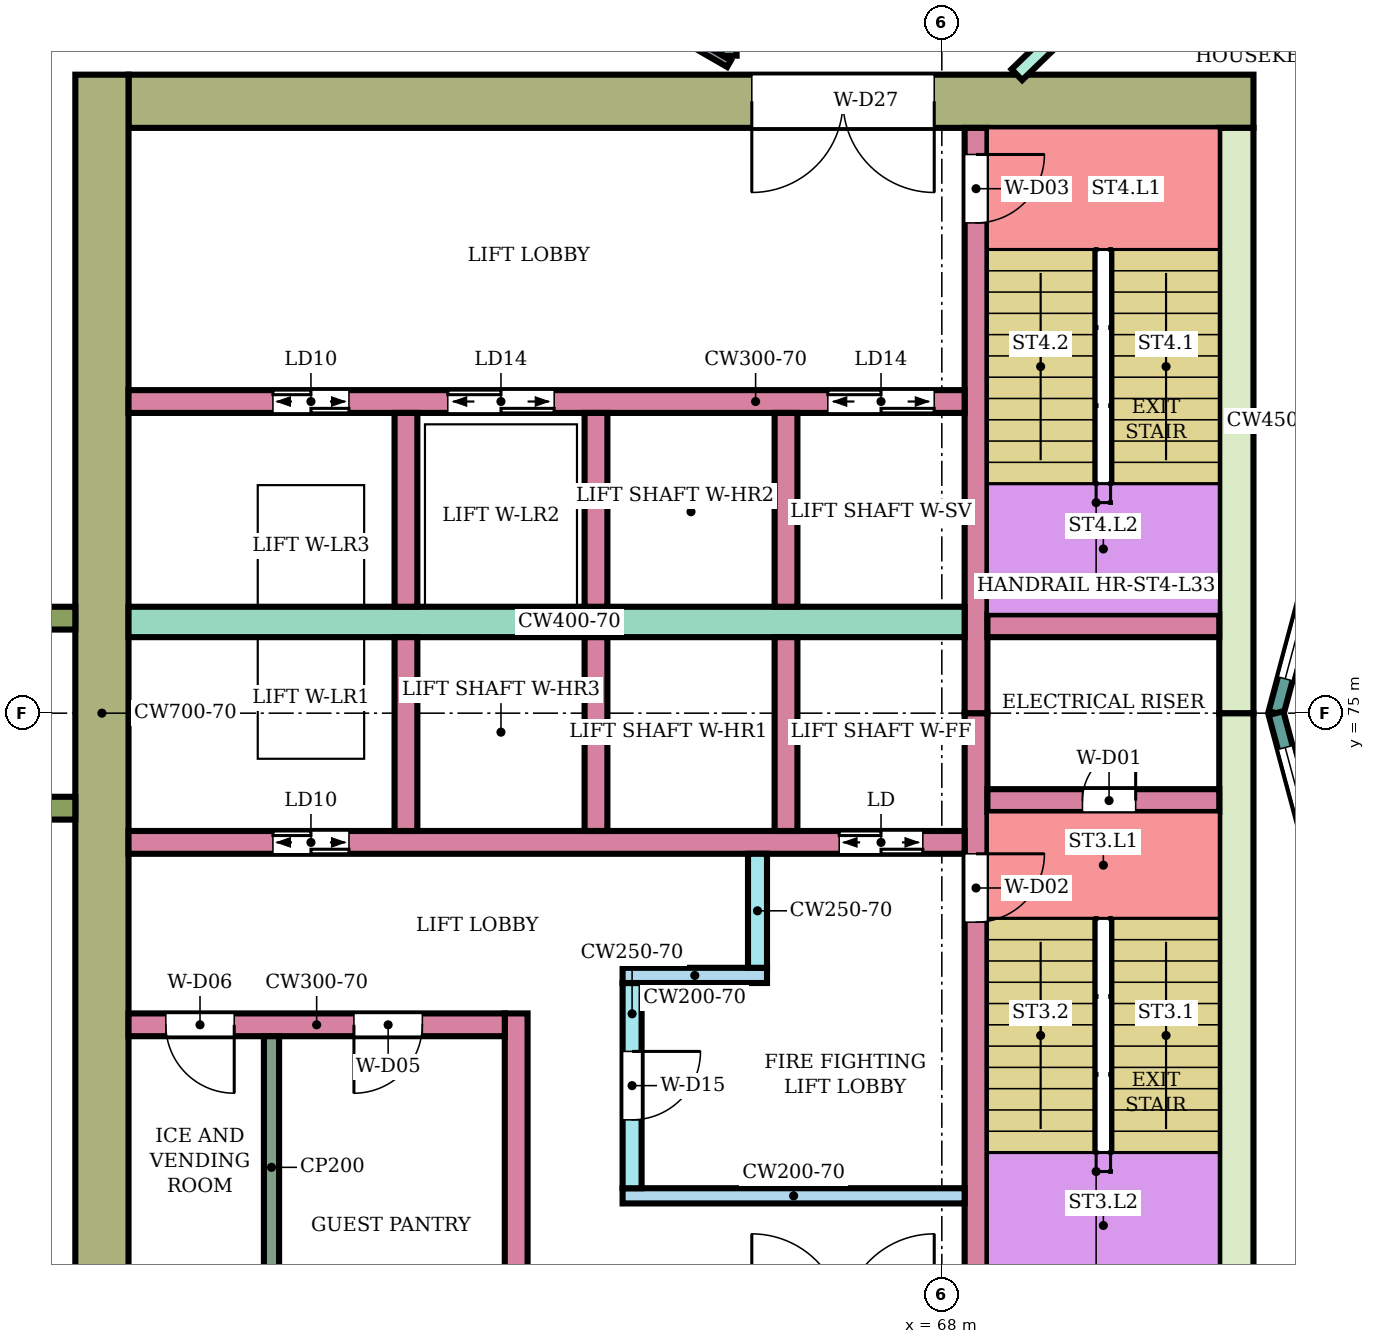
"""IFC4 building model, lengths in metres.
Left out: names, types, materials, properties, quantities, classifications, styles, units other than length and angle.
Written with IfcOpenShell. Run it as: python <this file> out.ifc"""

import sys

from ifc_helpers import new_model, si_unit, direction, frame, frame_2d, origin, place, context, subcontext, project, spatial, rectangle, extrude, element, fill, save


model = new_model("IFC4")
c1 = context("Model", 3, precision=1e-05, world=origin(), true_north=direction((0.0, 1.0)))
c2 = subcontext(c1, "Body", "Model", "MODEL_VIEW")
j1 = project(units=[si_unit("LENGTHUNIT", "METRE"), si_unit("PLANEANGLEUNIT", "RADIAN")], contexts=[c1])
p1 = place(None, origin())
s1 = spatial("IfcSite", under=j1, at=p1, CompositionType="ELEMENT")
p2 = place(p1, origin())
s2 = spatial("IfcBuilding", under=s1, at=p2, CompositionType="ELEMENT")
p3 = place(p2, frame((0.0, 0.0, 141.9)))
s3 = spatial("IfcBuildingStorey", under=s2, at=p3, CompositionType="ELEMENT", Elevation=141.9)
p4 = place(p3, frame((72.1, 83.05, 0.0), z_axis=(0.0, 0.0, 1.0), x_axis=(-1.0, 0.0, 0.0)))
e1 = element("IfcWall", 1, at=p4, inside=s3, PredefinedType="SHEAR", context=c2, shape_type="SweptSolid", body=[
    extrude(rectangle(XDim=14.8, YDim=0.7, at=frame_2d((7.4, 0.0))), origin(), (0.0, 0.0, 1.0), 3.58),
])
p5 = place(p4, frame((4.2, 0.0, 0.0)))
e2 = element("IfcOpeningElement", 2, at=p5, cuts=e1, PredefinedType="OPENING", context=c2, shape_type="SweptSolid", body=[
    extrude(rectangle(XDim=2.4, YDim=2.4, at=frame_2d((1.2, 1.2))), frame((0.0, 0.36, 0.0), z_axis=(0.0, -1.0, 0.0), x_axis=(1.0, 0.0, 0.0)), (0.0, 0.0, 1.0), 0.72),
])
for number, where, z_axis, x_axis in (
    (3, (71.875, 75.0, 0.0), (0.0, 0.0, 1.0), (0.0, -1.0, 0.0)),
    (4, (71.875, 82.7, 0.0), (0.0, 0.0, 1.0), (0.0, -1.0, 0.0)),
):
    element("IfcWall", number, at=place(p3, frame(where, z_axis=z_axis, x_axis=x_axis)), inside=s3, PredefinedType="SHEAR", context=c2, shape_type="SweptSolid", body=[
        extrude(rectangle(XDim=7.7, YDim=0.45, at=frame_2d((3.85, 0.0))), origin(), (0.0, 0.0, 1.0), 3.58),
    ])
p6 = place(p3, frame((56.95, 83.4, 0.0), z_axis=(0.0, 0.0, 1.0), x_axis=(0.0, -1.0, 0.0)))
e5 = element("IfcWall", 5, at=p6, inside=s3, PredefinedType="SHEAR", context=c2, shape_type="SweptSolid", body=[
    extrude(rectangle(XDim=16.8, YDim=0.7, at=frame_2d((8.4, 0.0))), origin(), (0.0, 0.0, 1.0), 3.58),
])
p7 = place(p3, frame((68.45, 75.0, 0.0), z_axis=(0.0, 0.0, 1.0), x_axis=(0.0, -1.0, 0.0)))
e6 = element("IfcWall", 6, at=p7, inside=s3, PredefinedType="SHEAR", context=c2, shape_type="SweptSolid", body=[
    extrude(rectangle(XDim=7.7, YDim=0.3, at=frame_2d((3.85, 0.0))), origin(), (0.0, 0.0, 1.0), 3.58),
])
p8 = place(p7, frame((1.85, 0.0, 0.0)))
e7 = element("IfcOpeningElement", 7, at=p8, cuts=e6, PredefinedType="OPENING", context=c2, shape_type="SweptSolid", body=[
    extrude(rectangle(XDim=0.9, YDim=2.1, at=frame_2d((0.45, 1.05))), frame((0.0, 0.16, 0.0), z_axis=(0.0, -1.0, 0.0), x_axis=(1.0, 0.0, 0.0)), (0.0, 0.0, 1.0), 0.32),
])
p9 = place(p3, frame((68.45, 82.7, 0.0), z_axis=(0.0, 0.0, 1.0), x_axis=(0.0, -1.0, 0.0)))
e8 = element("IfcWall", 8, at=p9, inside=s3, PredefinedType="SHEAR", context=c2, shape_type="SweptSolid", body=[
    extrude(rectangle(XDim=7.7, YDim=0.3, at=frame_2d((3.85, 0.0))), origin(), (0.0, 0.0, 1.0), 3.58),
])
p10 = place(p9, frame((0.35, 0.0, 0.0)))
e9 = element("IfcOpeningElement", 9, at=p10, cuts=e8, PredefinedType="OPENING", context=c2, shape_type="SweptSolid", body=[
    extrude(rectangle(XDim=0.9, YDim=2.1, at=frame_2d((0.45, 1.05))), frame((0.0, 0.16, 0.0), z_axis=(0.0, -1.0, 0.0), x_axis=(1.0, 0.0, 0.0)), (0.0, 0.0, 1.0), 0.32),
])
p11 = place(p3, frame((71.65, 73.85, 0.0), z_axis=(0.0, 0.0, 1.0), x_axis=(-1.0, 0.0, 0.0)))
e10 = element("IfcWall", 10, at=p11, inside=s3, PredefinedType="SHEAR", context=c2, shape_type="SweptSolid", body=[
    extrude(rectangle(XDim=3.05, YDim=0.3, at=frame_2d((1.525, 0.0))), origin(), (0.0, 0.0, 1.0), 3.58),
])
p12 = place(p11, frame((1.1, 0.0, 0.0)))
e11 = element("IfcOpeningElement", 11, at=p12, cuts=e10, PredefinedType="OPENING", context=c2, shape_type="SweptSolid", body=[
    extrude(rectangle(XDim=0.7, YDim=2.0, at=frame_2d((0.35, 1.0))), frame((0.0, 0.16, 0.0), z_axis=(0.0, -1.0, 0.0), x_axis=(1.0, 0.0, 0.0)), (0.0, 0.0, 1.0), 0.32),
])
p13 = place(p3, frame((71.65, 76.15, 0.0), z_axis=(0.0, 0.0, 1.0), x_axis=(-1.0, 0.0, 0.0)))
e12 = element("IfcWall", 12, at=p13, inside=s3, PredefinedType="SHEAR", context=c2, shape_type="SweptSolid", body=[
    extrude(rectangle(XDim=3.05, YDim=0.3, at=frame_2d((1.525, 0.0))), origin(), (0.0, 0.0, 1.0), 3.58),
])
p14 = place(p3, frame((68.3, 73.3, 0.0), z_axis=(0.0, 0.0, 1.0), x_axis=(-1.0, 0.0, 0.0)))
e13 = element("IfcWall", 13, at=p14, inside=s3, PredefinedType="SHEAR", context=c2, shape_type="SweptSolid", body=[
    extrude(rectangle(XDim=11.0, YDim=0.3, at=frame_2d((5.5, 0.0))), origin(), (0.0, 0.0, 1.0), 3.58),
])
p15 = place(p14, frame((0.55, 0.0, 0.0)))
e14 = element("IfcOpeningElement", 14, at=p15, cuts=e13, PredefinedType="OPENING", context=c2, shape_type="SweptSolid", body=[
    extrude(rectangle(XDim=1.1, YDim=2.1, at=frame_2d((0.55, 1.05))), frame((0.0, 0.16, 0.0), z_axis=(0.0, -1.0, 0.0), x_axis=(1.0, 0.0, 0.0)), (0.0, 0.0, 1.0), 0.32),
])
p16 = place(p14, frame((8.1, 0.0, 0.0)))
e15 = element("IfcOpeningElement", 15, at=p16, cuts=e13, PredefinedType="OPENING", context=c2, shape_type="SweptSolid", body=[
    extrude(rectangle(XDim=1.0, YDim=2.1, at=frame_2d((0.5, 1.05))), frame((0.0, 0.16, 0.0), z_axis=(0.0, -1.0, 0.0), x_axis=(1.0, 0.0, 0.0)), (0.0, 0.0, 1.0), 0.32),
])
p17 = place(p3, frame((68.3, 76.2, 0.0), z_axis=(0.0, 0.0, 1.0), x_axis=(-1.0, 0.0, 0.0)))
e16 = element("IfcWall", 16, at=p17, inside=s3, PredefinedType="SHEAR", context=c2, shape_type="SweptSolid", body=[
    extrude(rectangle(XDim=11.0, YDim=0.4, at=frame_2d((5.5, 0.0))), origin(), (0.0, 0.0, 1.0), 3.58),
])
p18 = place(p3, frame((68.3, 79.1, 0.0), z_axis=(0.0, 0.0, 1.0), x_axis=(-1.0, 0.0, 0.0)))
e17 = element("IfcWall", 17, at=p18, inside=s3, PredefinedType="SHEAR", context=c2, shape_type="SweptSolid", body=[
    extrude(rectangle(XDim=11.0, YDim=0.3, at=frame_2d((5.5, 0.0))), origin(), (0.0, 0.0, 1.0), 3.58),
])
p19 = place(p18, frame((0.4, 0.0, 0.0)))
e18 = element("IfcOpeningElement", 18, at=p19, cuts=e17, PredefinedType="OPENING", context=c2, shape_type="SweptSolid", body=[
    extrude(rectangle(XDim=1.4, YDim=2.1, at=frame_2d((0.7, 1.05))), frame((0.0, 0.16, 0.0), z_axis=(0.0, -1.0, 0.0), x_axis=(1.0, 0.0, 0.0)), (0.0, 0.0, 1.0), 0.32),
])
p20 = place(p18, frame((5.4, 0.0, 0.0)))
e19 = element("IfcOpeningElement", 19, at=p20, cuts=e17, PredefinedType="OPENING", context=c2, shape_type="SweptSolid", body=[
    extrude(rectangle(XDim=1.4, YDim=2.1, at=frame_2d((0.7, 1.05))), frame((0.0, 0.16, 0.0), z_axis=(0.0, -1.0, 0.0), x_axis=(1.0, 0.0, 0.0)), (0.0, 0.0, 1.0), 0.32),
])
p21 = place(p18, frame((8.1, 0.0, 0.0)))
e20 = element("IfcOpeningElement", 20, at=p21, cuts=e17, PredefinedType="OPENING", context=c2, shape_type="SweptSolid", body=[
    extrude(rectangle(XDim=1.0, YDim=2.1, at=frame_2d((0.5, 1.05))), frame((0.0, 0.16, 0.0), z_axis=(0.0, -1.0, 0.0), x_axis=(1.0, 0.0, 0.0)), (0.0, 0.0, 1.0), 0.32),
])
for number, where, z_axis, x_axis in (
    (21, (65.95, 76.0, 0.0), (0.0, 0.0, 1.0), (0.0, -1.0, 0.0)),
    (22, (63.45, 76.0, 0.0), (0.0, 0.0, 1.0), (0.0, -1.0, 0.0)),
    (23, (60.95, 76.0, 0.0), (0.0, 0.0, 1.0), (0.0, -1.0, 0.0)),
    (24, (65.95, 78.95, 0.0), (0.0, 0.0, 1.0), (0.0, -1.0, 0.0)),
    (25, (63.45, 78.95, 0.0), (0.0, 0.0, 1.0), (0.0, -1.0, 0.0)),
    (26, (60.95, 78.95, 0.0), (0.0, 0.0, 1.0), (0.0, -1.0, 0.0)),
):
    element("IfcWall", number, at=place(p3, frame(where, z_axis=z_axis, x_axis=x_axis)), inside=s3, PredefinedType="SHEAR", context=c2, shape_type="SweptSolid", body=[
        extrude(rectangle(XDim=2.55, YDim=0.3, at=frame_2d((1.275, 0.0))), origin(), (0.0, 0.0, 1.0), 3.58),
    ])
p22 = place(p3, frame((68.3, 68.65, 0.0), z_axis=(0.0, 0.0, 1.0), x_axis=(-1.0, 0.0, 0.0)))
e27 = element("IfcWall", 27, at=p22, inside=s3, PredefinedType="SHEAR", context=c2, shape_type="SweptSolid", body=[
    extrude(rectangle(XDim=4.5, YDim=0.2, at=frame_2d((2.25, 0.0))), origin(), (0.0, 0.0, 1.0), 3.58),
])
p23 = place(p3, frame((63.925, 71.45, 0.0), z_axis=(0.0, 0.0, 1.0), x_axis=(0.0, -1.0, 0.0)))
e28 = element("IfcWall", 28, at=p23, inside=s3, PredefinedType="SHEAR", context=c2, shape_type="SweptSolid", body=[
    extrude(rectangle(XDim=2.7, YDim=0.25, at=frame_2d((1.35, 0.0))), origin(), (0.0, 0.0, 1.0), 3.58),
])
p24 = place(p23, frame((0.9, 0.0, 0.0)))
e29 = element("IfcOpeningElement", 29, at=p24, cuts=e28, PredefinedType="OPENING", context=c2, shape_type="SweptSolid", body=[
    extrude(rectangle(XDim=0.9, YDim=2.1, at=frame_2d((0.45, 1.05))), frame((0.0, 0.135, 0.0), z_axis=(0.0, -1.0, 0.0), x_axis=(1.0, 0.0, 0.0)), (0.0, 0.0, 1.0), 0.27),
])
p25 = place(p3, frame((65.7, 71.55, 0.0), z_axis=(0.0, 0.0, 1.0), x_axis=(-1.0, 0.0, 0.0)))
e30 = element("IfcWall", 30, at=p25, inside=s3, PredefinedType="SHEAR", context=c2, shape_type="SweptSolid", body=[
    extrude(rectangle(XDim=1.9, YDim=0.2, at=frame_2d((0.95, 0.0))), origin(), (0.0, 0.0, 1.0), 3.58),
])
p26 = place(p3, frame((65.575, 73.15, 0.0), z_axis=(0.0, 0.0, 1.0), x_axis=(0.0, -1.0, 0.0)))
e31 = element("IfcWall", 31, at=p26, inside=s3, PredefinedType="SHEAR", context=c2, shape_type="SweptSolid", body=[
    extrude(rectangle(XDim=1.5, YDim=0.25, at=frame_2d((0.75, 0.0))), origin(), (0.0, 0.0, 1.0), 3.58),
])
p27 = place(p3, frame((62.4, 71.05, 0.0), z_axis=(0.0, 0.0, 1.0), x_axis=(0.0, -1.0, 0.0)))
e32 = element("IfcWall", 32, at=p27, inside=s3, PredefinedType="SHEAR", context=c2, shape_type="SweptSolid", body=[
    extrude(rectangle(XDim=3.75, YDim=0.3, at=frame_2d((1.875, 0.0))), origin(), (0.0, 0.0, 1.0), 3.58),
])
p28 = place(p3, frame((62.25, 70.9, 0.0), z_axis=(0.0, 0.0, 1.0), x_axis=(-1.0, 0.0, 0.0)))
e33 = element("IfcWall", 33, at=p28, inside=s3, PredefinedType="SHEAR", context=c2, shape_type="SweptSolid", body=[
    extrude(rectangle(XDim=4.95, YDim=0.3, at=frame_2d((2.475, 0.0))), origin(), (0.0, 0.0, 1.0), 3.58),
])
p29 = place(p28, frame((1.084, 0.0, 0.0)))
e34 = element("IfcOpeningElement", 34, at=p29, cuts=e33, PredefinedType="OPENING", context=c2, shape_type="SweptSolid", body=[
    extrude(rectangle(XDim=0.9, YDim=2.1, at=frame_2d((0.45, 1.05))), frame((0.0, 0.16, 0.0), z_axis=(0.0, -1.0, 0.0), x_axis=(1.0, 0.0, 0.0)), (0.0, 0.0, 1.0), 0.32),
])
p30 = place(p28, frame((3.56, 0.0, 0.0)))
e35 = element("IfcOpeningElement", 35, at=p30, cuts=e33, PredefinedType="OPENING", context=c2, shape_type="SweptSolid", body=[
    extrude(rectangle(XDim=0.9, YDim=2.1, at=frame_2d((0.45, 1.05))), frame((0.0, 0.16, 0.0), z_axis=(0.0, -1.0, 0.0), x_axis=(1.0, 0.0, 0.0)), (0.0, 0.0, 1.0), 0.32),
])
for number, where, z_axis, x_axis in (
    (36, (56.6, 76.25, 0.0), (0.0, 0.0, 1.0), (-1.0, 0.0, 0.0)),
    (37, (56.6, 73.75, 0.0), (0.0, 0.0, 1.0), (-1.0, 0.0, 0.0)),
):
    element("IfcWall", number, at=place(p3, frame(where, z_axis=z_axis, x_axis=x_axis)), inside=s3, PredefinedType="NOTDEFINED", context=c2, shape_type="SweptSolid", body=[
        extrude(rectangle(XDim=2.416, YDim=0.3, at=frame_2d((1.208, 0.0))), origin(), (0.0, 0.0, 1.0), 3.9),
    ])
p31 = place(p3, frame((73.415, 78.802, 0.0), z_axis=(0.0, 0.0, 1.0), x_axis=(-0.258789828301, -0.965933654434, 0.0)))
e38 = element("IfcWall", 38, at=p31, inside=s3, PredefinedType="NOTDEFINED", context=c2, shape_type="SweptSolid", body=[
    extrude(rectangle(XDim=3.936, YDim=0.2, at=frame_2d((1.968, 0.0))), origin(), (0.0, 0.0, 1.0), 3.9),
])
p32 = place(p31, frame((0.468, 0.0, 0.9)))
e39 = element("IfcOpeningElement", 39, at=p32, cuts=e38, PredefinedType="OPENING", context=c2, shape_type="SweptSolid", body=[
    extrude(rectangle(XDim=3.0, YDim=2.3, at=frame_2d((1.5, 1.15))), frame((0.0, 0.11, 0.0), z_axis=(0.0, -1.0, 0.0), x_axis=(1.0, 0.0, 0.0)), (0.0, 0.0, 1.0), 0.22),
])
p33 = place(p3, frame((72.396, 75.0, 0.0), z_axis=(0.0, 0.0, 1.0), x_axis=(0.258789828301, -0.965933654434, 0.0)))
e40 = element("IfcWall", 40, at=p33, inside=s3, PredefinedType="NOTDEFINED", context=c2, shape_type="SweptSolid", body=[
    extrude(rectangle(XDim=3.936, YDim=0.2, at=frame_2d((1.968, 0.0))), origin(), (0.0, 0.0, 1.0), 3.9),
])
p34 = place(p33, frame((0.468, 0.0, 0.9)))
e41 = element("IfcOpeningElement", 41, at=p34, cuts=e40, PredefinedType="OPENING", context=c2, shape_type="SweptSolid", body=[
    extrude(rectangle(XDim=3.0, YDim=2.3, at=frame_2d((1.5, 1.15))), frame((0.0, 0.11, 0.0), z_axis=(0.0, -1.0, 0.0), x_axis=(1.0, 0.0, 0.0)), (0.0, 0.0, 1.0), 0.22),
])
p35 = place(p3, frame((65.2, 83.65, 0.0), z_axis=(0.0, 0.0, 1.0), x_axis=(0.0, 1.0, 0.0)))
e42 = element("IfcWall", 42, at=p35, inside=s3, PredefinedType="PARTITIONING", context=c2, shape_type="SweptSolid", body=[
    extrude(rectangle(XDim=1.15, YDim=0.2, at=frame_2d((0.575, 0.0))), origin(), (0.0, 0.0, 1.0), 3.45),
])
p36 = place(p3, frame((68.987, 83.4, 0.0), z_axis=(0.0, 0.0, 1.0), x_axis=(0.719547721855, 0.694442996922, 0.0)))
e43 = element("IfcWall", 43, at=p36, inside=s3, PredefinedType="PARTITIONING", context=c2, shape_type="SweptSolid", body=[
    extrude(rectangle(XDim=5.378, YDim=0.2, at=frame_2d((2.689, 0.0))), origin(), (0.0, 0.0, 1.0), 3.45),
])
p37 = place(p36, frame((2.294, 0.0, 0.0)))
e44 = element("IfcOpeningElement", 44, at=p37, cuts=e43, PredefinedType="OPENING", context=c2, shape_type="SweptSolid", body=[
    extrude(rectangle(XDim=0.9, YDim=2.1, at=frame_2d((0.45, 1.05))), frame((0.0, 0.11, 0.0), z_axis=(0.0, -1.0, 0.0), x_axis=(1.0, 0.0, 0.0)), (0.0, 0.0, 1.0), 0.22),
])
p38 = place(p3, frame((57.659, 87.899, 0.0), z_axis=(0.0, 0.0, 1.0), x_axis=(0.86602264145, -0.500004784474, 0.0)))
e45 = element("IfcWall", 45, at=p38, inside=s3, PredefinedType="PARTITIONING", context=c2, shape_type="SweptSolid", body=[
    extrude(rectangle(XDim=8.708, YDim=0.1, at=frame_2d((4.354, 0.0))), origin(), (0.0, 0.0, 1.0), 3.45),
])
p39 = place(p38, frame((3.929, 0.0, 0.0)))
e46 = element("IfcOpeningElement", 46, at=p39, cuts=e45, PredefinedType="OPENING", context=c2, shape_type="SweptSolid", body=[
    extrude(rectangle(XDim=0.9, YDim=2.1, at=frame_2d((0.45, 1.05))), frame((0.0, 0.06, 0.0), z_axis=(0.0, -1.0, 0.0), x_axis=(1.0, 0.0, 0.0)), (0.0, 0.0, 1.0), 0.12),
])
p40 = place(p3, frame((59.181, 70.75, 0.0), z_axis=(0.0, 0.0, 1.0), x_axis=(0.0, -1.0, 0.0)))
e47 = element("IfcWall", 47, at=p40, inside=s3, PredefinedType="PARTITIONING", context=c2, shape_type="SweptSolid", body=[
    extrude(rectangle(XDim=3.45, YDim=0.2, at=frame_2d((1.725, 0.0))), origin(), (0.0, 0.0, 1.0), 3.58),
])
p41 = place(p32, origin())
e48 = element("IfcWindow", 48, at=p41, inside=s3, PartitioningType="SINGLE_PANEL", PredefinedType="WINDOW", context=c2, shape_type="SweptSolid", body=[
    extrude(rectangle(XDim=3.0, YDim=2.3, at=frame_2d((1.5, 1.15))), frame((0.0, 0.03, 0.0), z_axis=(0.0, -1.0, 0.0), x_axis=(1.0, 0.0, 0.0)), (0.0, 0.0, 1.0), 0.06),
])
fill(e39, e48)
p42 = place(p34, origin())
e49 = element("IfcWindow", 49, at=p42, inside=s3, PartitioningType="SINGLE_PANEL", PredefinedType="WINDOW", context=c2, shape_type="SweptSolid", body=[
    extrude(rectangle(XDim=3.0, YDim=2.3, at=frame_2d((1.5, 1.15))), frame((0.0, 0.03, 0.0), z_axis=(0.0, -1.0, 0.0), x_axis=(1.0, 0.0, 0.0)), (0.0, 0.0, 1.0), 0.06),
])
fill(e41, e49)
p43 = place(p12, frame((0.7, 0.0, 0.0), z_axis=(0.0, 0.0, 1.0), x_axis=(-1.0, 0.0, 0.0)))
e50 = element("IfcDoor", 50, at=p43, inside=s3, OperationType="SINGLE_SWING_RIGHT", PredefinedType="DOOR", context=c2, shape_type="SweptSolid", body=[
    extrude(rectangle(XDim=0.7, YDim=2.0, at=frame_2d((0.35, 1.0))), frame((0.0, 0.025, 0.0), z_axis=(0.0, -1.0, 0.0), x_axis=(1.0, 0.0, 0.0)), (0.0, 0.0, 1.0), 0.05),
])
fill(e11, e50)
p44 = place(p8, origin())
e51 = element("IfcDoor", 51, at=p44, inside=s3, OperationType="SINGLE_SWING_LEFT", PredefinedType="DOOR", context=c2, shape_type="SweptSolid", body=[
    extrude(rectangle(XDim=0.9, YDim=2.1, at=frame_2d((0.45, 1.05))), frame((0.0, 0.025, 0.0), z_axis=(0.0, -1.0, 0.0), x_axis=(1.0, 0.0, 0.0)), (0.0, 0.0, 1.0), 0.05),
])
fill(e7, e51)
p45 = place(p10, origin())
e52 = element("IfcDoor", 52, at=p45, inside=s3, OperationType="SINGLE_SWING_LEFT", PredefinedType="DOOR", context=c2, shape_type="SweptSolid", body=[
    extrude(rectangle(XDim=0.9, YDim=2.1, at=frame_2d((0.45, 1.05))), frame((0.0, 0.025, 0.0), z_axis=(0.0, -1.0, 0.0), x_axis=(1.0, 0.0, 0.0)), (0.0, 0.0, 1.0), 0.05),
])
fill(e9, e52)
p46 = place(p15, origin())
e53 = element("IfcDoor", 53, at=p46, inside=s3, OperationType="DOUBLE_DOOR_SLIDING", PredefinedType="DOOR", context=c2, shape_type="SweptSolid", body=[
    extrude(rectangle(XDim=1.1, YDim=2.1, at=frame_2d((0.55, 1.05))), frame((0.0, 0.025, 0.0), z_axis=(0.0, -1.0, 0.0), x_axis=(1.0, 0.0, 0.0)), (0.0, 0.0, 1.0), 0.05),
])
fill(e14, e53)
p47 = place(p16, origin())
e54 = element("IfcDoor", 54, at=p47, inside=s3, OperationType="DOUBLE_DOOR_SLIDING", PredefinedType="DOOR", context=c2, shape_type="SweptSolid", body=[
    extrude(rectangle(XDim=1.0, YDim=2.1, at=frame_2d((0.5, 1.05))), frame((0.0, 0.025, 0.0), z_axis=(0.0, -1.0, 0.0), x_axis=(1.0, 0.0, 0.0)), (0.0, 0.0, 1.0), 0.05),
])
fill(e15, e54)
p48 = place(p19, origin())
e55 = element("IfcDoor", 55, at=p48, inside=s3, OperationType="DOUBLE_DOOR_SLIDING", PredefinedType="DOOR", context=c2, shape_type="SweptSolid", body=[
    extrude(rectangle(XDim=1.4, YDim=2.1, at=frame_2d((0.7, 1.05))), frame((0.0, 0.025, 0.0), z_axis=(0.0, -1.0, 0.0), x_axis=(1.0, 0.0, 0.0)), (0.0, 0.0, 1.0), 0.05),
])
fill(e18, e55)
p49 = place(p20, origin())
e56 = element("IfcDoor", 56, at=p49, inside=s3, OperationType="DOUBLE_DOOR_SLIDING", PredefinedType="DOOR", context=c2, shape_type="SweptSolid", body=[
    extrude(rectangle(XDim=1.4, YDim=2.1, at=frame_2d((0.7, 1.05))), frame((0.0, 0.025, 0.0), z_axis=(0.0, -1.0, 0.0), x_axis=(1.0, 0.0, 0.0)), (0.0, 0.0, 1.0), 0.05),
])
fill(e19, e56)
p50 = place(p21, origin())
e57 = element("IfcDoor", 57, at=p50, inside=s3, OperationType="DOUBLE_DOOR_SLIDING", PredefinedType="DOOR", context=c2, shape_type="SweptSolid", body=[
    extrude(rectangle(XDim=1.0, YDim=2.1, at=frame_2d((0.5, 1.05))), frame((0.0, 0.025, 0.0), z_axis=(0.0, -1.0, 0.0), x_axis=(1.0, 0.0, 0.0)), (0.0, 0.0, 1.0), 0.05),
])
fill(e20, e57)
p51 = place(p24, origin())
e58 = element("IfcDoor", 58, at=p51, inside=s3, OperationType="SINGLE_SWING_LEFT", PredefinedType="DOOR", context=c2, shape_type="SweptSolid", body=[
    extrude(rectangle(XDim=0.9, YDim=2.1, at=frame_2d((0.45, 1.05))), frame((0.0, 0.025, 0.0), z_axis=(0.0, -1.0, 0.0), x_axis=(1.0, 0.0, 0.0)), (0.0, 0.0, 1.0), 0.05),
])
fill(e29, e58)
p52 = place(p29, origin())
e59 = element("IfcDoor", 59, at=p52, inside=s3, OperationType="SINGLE_SWING_RIGHT", PredefinedType="DOOR", context=c2, shape_type="SweptSolid", body=[
    extrude(rectangle(XDim=0.9, YDim=2.1, at=frame_2d((0.45, 1.05))), frame((0.0, 0.025, 0.0), z_axis=(0.0, -1.0, 0.0), x_axis=(1.0, 0.0, 0.0)), (0.0, 0.0, 1.0), 0.05),
])
fill(e34, e59)
p53 = place(p30, origin())
e60 = element("IfcDoor", 60, at=p53, inside=s3, OperationType="SINGLE_SWING_LEFT", PredefinedType="DOOR", context=c2, shape_type="SweptSolid", body=[
    extrude(rectangle(XDim=0.9, YDim=2.1, at=frame_2d((0.45, 1.05))), frame((0.0, 0.025, 0.0), z_axis=(0.0, -1.0, 0.0), x_axis=(1.0, 0.0, 0.0)), (0.0, 0.0, 1.0), 0.05),
])
fill(e35, e60)
p54 = place(p5, origin())
e61 = element("IfcDoor", 61, at=p54, inside=s3, OperationType="DOUBLE_DOOR_SINGLE_SWING", PredefinedType="DOOR", context=c2, shape_type="SweptSolid", body=[
    extrude(rectangle(XDim=2.4, YDim=2.4, at=frame_2d((1.2, 1.2))), frame((0.0, 0.025, 0.0), z_axis=(0.0, -1.0, 0.0), x_axis=(1.0, 0.0, 0.0)), (0.0, 0.0, 1.0), 0.05),
])
fill(e2, e61)
save(model, sys.argv[1])
